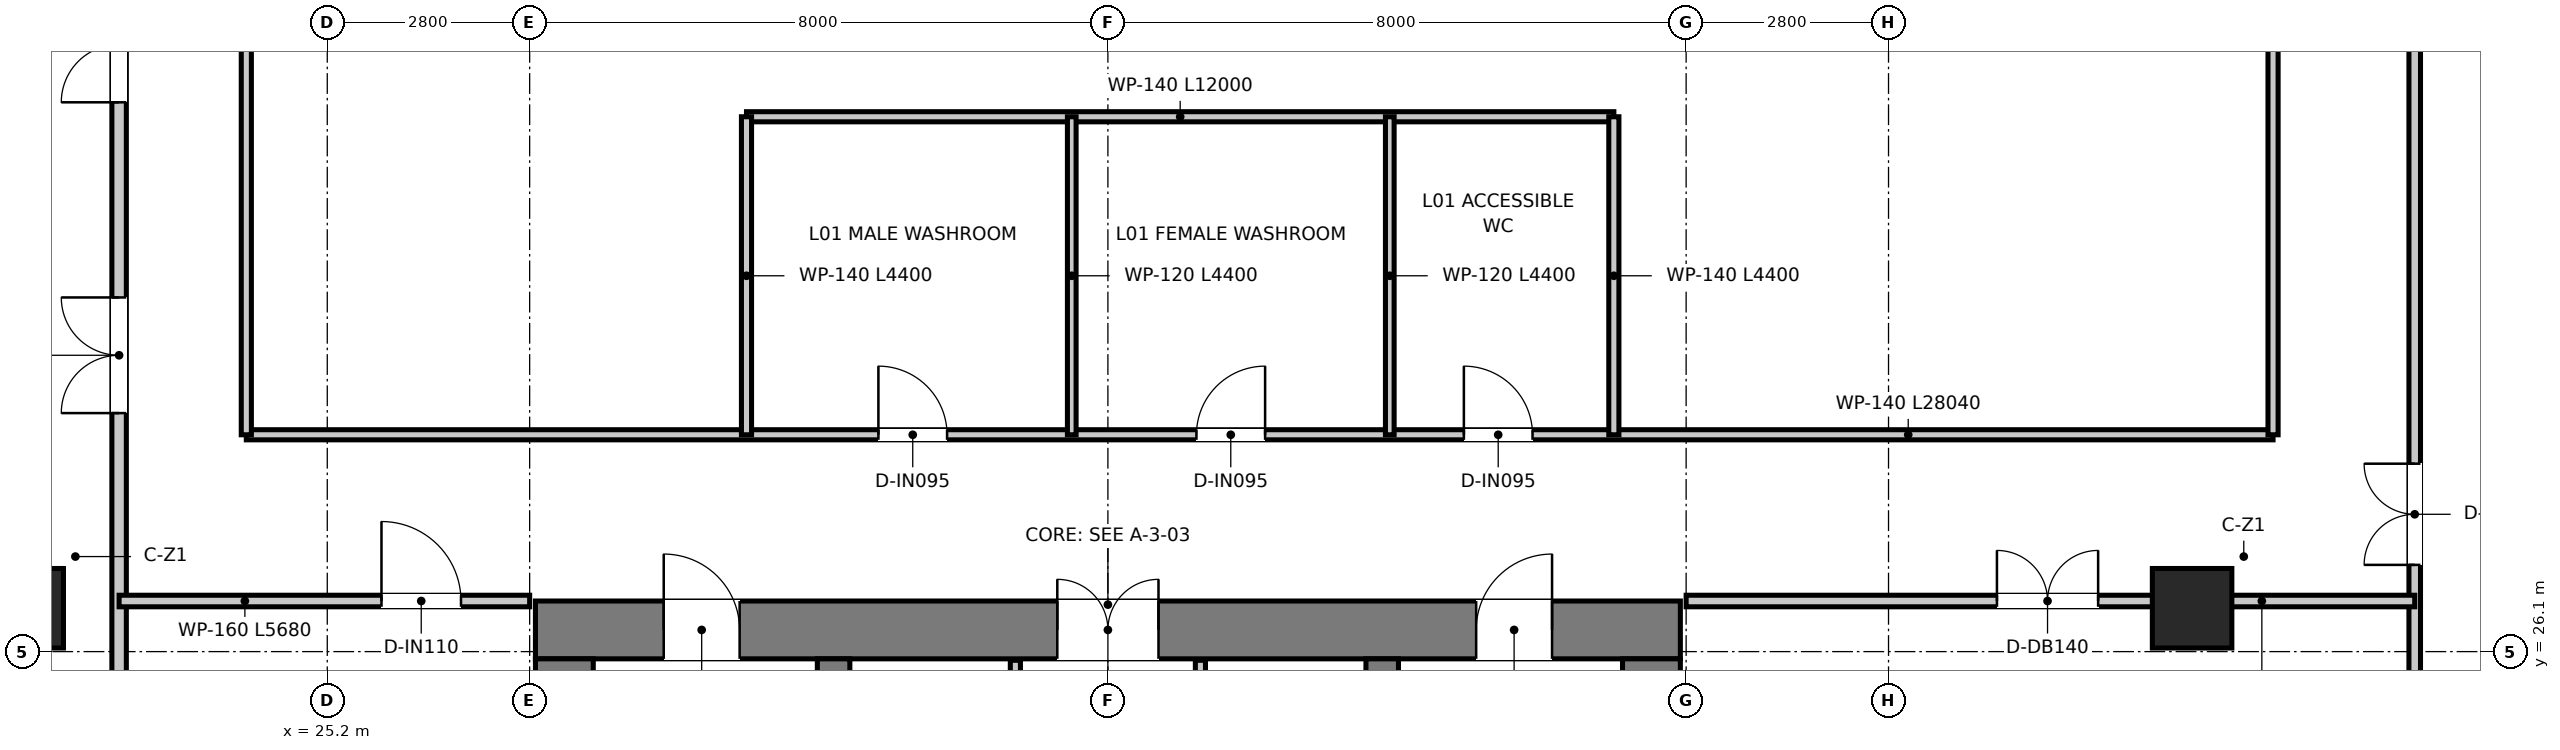
"""IFC4 building model, lengths in metres.
Left out: names, types, materials, properties, quantities, classifications, styles, units other than length and angle.
Written with IfcOpenShell. Run it as: python <this file> out.ifc"""

import sys

from ifc_helpers import new_model, si_unit, direction, frame, frame_2d, origin, origin_2d, place, context, subcontext, project, spatial, rectangle, extrude, source, transform, mapped, element, fill, save


model = new_model("IFC4")
c1 = context("Model", 3, precision=1e-05, world=origin(), true_north=direction((0.0, 1.0)))
c2 = subcontext(c1, "Body", "Model", "MODEL_VIEW")
j1 = project(units=[si_unit("LENGTHUNIT", "METRE"), si_unit("PLANEANGLEUNIT", "RADIAN")], contexts=[c1])
p1 = place(None, origin())
s1 = spatial("IfcSite", under=j1, at=p1, CompositionType="ELEMENT")
p2 = place(p1, origin())
s2 = spatial("IfcBuilding", under=s1, at=p2, CompositionType="ELEMENT")
p3 = place(p2, frame((0.0, 0.0, 5.4)))
s3 = spatial("IfcBuildingStorey", under=s2, at=p3, CompositionType="ELEMENT", Elevation=5.4)
p4 = place(p3, frame((28.08, 26.4, 0.0), z_axis=(0.0, 0.0, 1.0), x_axis=(1.0, 0.0, 0.0)))
e1 = element("IfcWall", 1, at=p4, inside=s3, PredefinedType="SHEAR", context=c2, shape_type="SweptSolid", body=[
    extrude(rectangle(XDim=15.84, YDim=0.8, at=frame_2d((7.92, 0.0))), origin(), (0.0, 0.0, 1.0), 5.0),
])
p5 = place(p4, frame((7.22, 0.0, 0.0)))
e2 = element("IfcOpeningElement", 2, at=p5, cuts=e1, PredefinedType="OPENING", context=c2, shape_type="SweptSolid", body=[
    extrude(rectangle(XDim=1.4, YDim=2.2, at=frame_2d((0.7, 1.1))), frame((0.0, 0.41, 0.0), z_axis=(0.0, -1.0, 0.0), x_axis=(1.0, 0.0, 0.0)), (0.0, 0.0, 1.0), 0.82),
])
p6 = place(p4, frame((1.775, 0.0, 0.0)))
e3 = element("IfcOpeningElement", 3, at=p6, cuts=e1, PredefinedType="OPENING", context=c2, shape_type="SweptSolid", body=[
    extrude(rectangle(XDim=1.05, YDim=2.1, at=frame_2d((0.525, 1.05))), frame((0.0, 0.41, 0.0), z_axis=(0.0, -1.0, 0.0), x_axis=(1.0, 0.0, 0.0)), (0.0, 0.0, 1.0), 0.82),
])
p7 = place(p4, frame((13.015, 0.0, 0.0)))
e4 = element("IfcOpeningElement", 4, at=p7, cuts=e1, PredefinedType="OPENING", context=c2, shape_type="SweptSolid", body=[
    extrude(rectangle(XDim=1.05, YDim=2.1, at=frame_2d((0.525, 1.05))), frame((0.0, 0.41, 0.0), z_axis=(0.0, -1.0, 0.0), x_axis=(1.0, 0.0, 0.0)), (0.0, 0.0, 1.0), 0.82),
])
for number, where, z_axis, x_axis in (
    (5, (28.48, 11.3, 0.0), (0.0, 0.0, 1.0), (0.0, 1.0, 0.0)),
    (6, (43.52, 11.3, 0.0), (0.0, 0.0, 1.0), (0.0, 1.0, 0.0)),
):
    element("IfcWall", number, at=place(p3, frame(where, z_axis=z_axis, x_axis=x_axis)), inside=s3, PredefinedType="SHEAR", context=c2, shape_type="SweptSolid", body=[
        extrude(rectangle(XDim=14.7, YDim=0.8, at=frame_2d((7.35, 0.0))), origin(), (0.0, 0.0, 1.0), 5.0),
    ])
p8 = place(p3, frame((32.205, 13.22, 0.0), z_axis=(0.0, 0.0, 1.0), x_axis=(0.0, 1.0, 0.0)))
e7 = element("IfcWall", 7, at=p8, inside=s3, PredefinedType="SHEAR", context=c2, shape_type="SweptSolid", body=[
    extrude(rectangle(XDim=12.78, YDim=0.45, at=frame_2d((6.39, 0.0))), origin(), (0.0, 0.0, 1.0), 5.0),
])
p9 = place(p8, frame((10.58, 0.0, 0.0)))
e8 = element("IfcOpeningElement", 8, at=p9, cuts=e7, PredefinedType="OPENING", context=c2, shape_type="SweptSolid", body=[
    extrude(rectangle(XDim=1.1, YDim=2.15, at=frame_2d((0.55, 1.075))), frame((0.0, 0.235, 0.0), z_axis=(0.0, -1.0, 0.0), x_axis=(1.0, 0.0, 0.0)), (0.0, 0.0, 1.0), 0.47),
])
p10 = place(p3, frame((39.795, 13.22, 0.0), z_axis=(0.0, 0.0, 1.0), x_axis=(0.0, 1.0, 0.0)))
e9 = element("IfcWall", 9, at=p10, inside=s3, PredefinedType="SHEAR", context=c2, shape_type="SweptSolid", body=[
    extrude(rectangle(XDim=12.78, YDim=0.45, at=frame_2d((6.39, 0.0))), origin(), (0.0, 0.0, 1.0), 5.0),
])
p11 = place(p10, frame((10.58, 0.0, 0.0)))
e10 = element("IfcOpeningElement", 10, at=p11, cuts=e9, PredefinedType="OPENING", context=c2, shape_type="SweptSolid", body=[
    extrude(rectangle(XDim=1.1, YDim=2.15, at=frame_2d((0.55, 1.075))), frame((0.0, 0.235, 0.0), z_axis=(0.0, -1.0, 0.0), x_axis=(1.0, 0.0, 0.0)), (0.0, 0.0, 1.0), 0.47),
])
m1 = source(origin(), c2, "Body", "SweptSolid", [
    extrude(rectangle(XDim=1.1, YDim=1.1, at=origin_2d()), origin(), (0.0, 0.0, 1.0), 5.0),
])
for number, where, z_axis, x_axis in (
    (11, (21.0, 26.7, 0.0), (0.0, 0.0, 1.0), (1.0, 0.0, 0.0)),
    (12, (51.0, 26.7, 0.0), (0.0, 0.0, 1.0), (1.0, 0.0, 0.0)),
):
    element("IfcColumn", number, at=place(p3, frame(where, z_axis=z_axis, x_axis=x_axis)), inside=s3, PredefinedType="COLUMN", context=c2, shape_type="MappedRepresentation", body=[
        mapped(m1, transform((0.0, 0.0, 0.0), x_axis=(1.0, 0.0, 0.0), y_axis=(0.0, 1.0, 0.0), z_axis=(0.0, 0.0, 1.0), scale=1.0)),
    ])
p12 = place(p3, frame((34.72, 20.2, 0.0), z_axis=(0.0, 0.0, 1.0), x_axis=(0.0, 1.0, 0.0)))
e13 = element("IfcWall", 13, at=p12, inside=s3, PredefinedType="PARTITIONING", context=c2, shape_type="SweptSolid", body=[
    extrude(rectangle(XDim=5.78, YDim=0.14, at=frame_2d((2.89, 0.0))), origin(), (0.0, 0.0, 1.0), 3.5),
])
p13 = place(p12, frame((1.05, 0.0, 0.0)))
e14 = element("IfcOpeningElement", 14, at=p13, cuts=e13, PredefinedType="OPENING", context=c2, shape_type="SweptSolid", body=[
    extrude(rectangle(XDim=0.9, YDim=2.1, at=frame_2d((0.45, 1.05))), frame((0.0, 0.08, 0.0), z_axis=(0.0, -1.0, 0.0), x_axis=(1.0, 0.0, 0.0)), (0.0, 0.0, 1.0), 0.16),
])
p14 = place(p3, frame((37.28, 20.2, 0.0), z_axis=(0.0, 0.0, 1.0), x_axis=(0.0, 1.0, 0.0)))
e15 = element("IfcWall", 15, at=p14, inside=s3, PredefinedType="PARTITIONING", context=c2, shape_type="SweptSolid", body=[
    extrude(rectangle(XDim=5.78, YDim=0.14, at=frame_2d((2.89, 0.0))), origin(), (0.0, 0.0, 1.0), 3.5),
])
p15 = place(p14, frame((0.95, 0.0, 0.0)))
e16 = element("IfcOpeningElement", 16, at=p15, cuts=e15, PredefinedType="OPENING", context=c2, shape_type="SweptSolid", body=[
    extrude(rectangle(XDim=1.1, YDim=2.15, at=frame_2d((0.55, 1.075))), frame((0.0, 0.08, 0.0), z_axis=(0.0, -1.0, 0.0), x_axis=(1.0, 0.0, 0.0)), (0.0, 0.0, 1.0), 0.16),
])
p16 = place(p3, frame((24.08, 29.1, 0.0), z_axis=(0.0, 0.0, 1.0), x_axis=(1.0, 0.0, 0.0)))
e17 = element("IfcWall", 17, at=p16, inside=s3, PredefinedType="PARTITIONING", context=c2, shape_type="SweptSolid", body=[
    extrude(rectangle(XDim=28.04, YDim=0.14, at=frame_2d((14.02, 0.0))), origin(), (0.0, 0.0, 1.0), 3.9),
])
p17 = place(p16, frame((8.745, 0.0, 0.0)))
e18 = element("IfcOpeningElement", 18, at=p17, cuts=e17, PredefinedType="OPENING", context=c2, shape_type="SweptSolid", body=[
    extrude(rectangle(XDim=0.95, YDim=2.1, at=frame_2d((0.475, 1.05))), frame((0.0, 0.08, 0.0), z_axis=(0.0, -1.0, 0.0), x_axis=(1.0, 0.0, 0.0)), (0.0, 0.0, 1.0), 0.16),
])
p18 = place(p16, frame((13.145, 0.0, 0.0)))
e19 = element("IfcOpeningElement", 19, at=p18, cuts=e17, PredefinedType="OPENING", context=c2, shape_type="SweptSolid", body=[
    extrude(rectangle(XDim=0.95, YDim=2.1, at=frame_2d((0.475, 1.05))), frame((0.0, 0.08, 0.0), z_axis=(0.0, -1.0, 0.0), x_axis=(1.0, 0.0, 0.0)), (0.0, 0.0, 1.0), 0.16),
])
p19 = place(p16, frame((16.845, 0.0, 0.0)))
e20 = element("IfcOpeningElement", 20, at=p19, cuts=e17, PredefinedType="OPENING", context=c2, shape_type="SweptSolid", body=[
    extrude(rectangle(XDim=0.95, YDim=2.1, at=frame_2d((0.475, 1.05))), frame((0.0, 0.08, 0.0), z_axis=(0.0, -1.0, 0.0), x_axis=(1.0, 0.0, 0.0)), (0.0, 0.0, 1.0), 0.16),
])
p20 = place(p3, frame((22.32, 0.605, 0.0), z_axis=(0.0, 0.0, 1.0), x_axis=(0.0, 1.0, 0.0)))
e21 = element("IfcWall", 21, at=p20, inside=s3, PredefinedType="PARTITIONING", context=c2, shape_type="SweptSolid", body=[
    extrude(rectangle(XDim=49.215, YDim=0.2, at=frame_2d((24.607, 0.0))), origin(), (0.0, 0.0, 1.0), 4.0),
])
p21 = place(p20, frame((28.795, 0.0, 0.0)))
e22 = element("IfcOpeningElement", 22, at=p21, cuts=e21, PredefinedType="OPENING", context=c2, shape_type="SweptSolid", body=[
    extrude(rectangle(XDim=1.6, YDim=2.2, at=frame_2d((0.8, 1.1))), frame((0.0, 0.11, 0.0), z_axis=(0.0, -1.0, 0.0), x_axis=(1.0, 0.0, 0.0)), (0.0, 0.0, 1.0), 0.22),
])
p22 = place(p20, frame((33.095, 0.0, 0.0)))
e23 = element("IfcOpeningElement", 23, at=p22, cuts=e21, PredefinedType="OPENING", context=c2, shape_type="SweptSolid", body=[
    extrude(rectangle(XDim=1.6, YDim=2.2, at=frame_2d((0.8, 1.1))), frame((0.0, 0.11, 0.0), z_axis=(0.0, -1.0, 0.0), x_axis=(1.0, 0.0, 0.0)), (0.0, 0.0, 1.0), 0.22),
])
p23 = place(p20, frame((42.845, 0.0, 0.0)))
e24 = element("IfcOpeningElement", 24, at=p23, cuts=e21, PredefinedType="OPENING", context=c2, shape_type="SweptSolid", body=[
    extrude(rectangle(XDim=1.1, YDim=2.15, at=frame_2d((0.55, 1.075))), frame((0.0, 0.11, 0.0), z_axis=(0.0, -1.0, 0.0), x_axis=(1.0, 0.0, 0.0)), (0.0, 0.0, 1.0), 0.22),
])
p24 = place(p3, frame((24.08, 29.1, 0.0), z_axis=(0.0, 0.0, 1.0), x_axis=(0.0, 1.0, 0.0)))
e25 = element("IfcWall", 25, at=p24, inside=s3, PredefinedType="PARTITIONING", context=c2, shape_type="SweptSolid", body=[
    extrude(rectangle(XDim=20.72, YDim=0.14, at=frame_2d((10.36, 0.0))), origin(), (0.0, 0.0, 1.0), 4.0),
])
p25 = place(p24, frame((11.2, 0.0, 0.0)))
e26 = element("IfcOpeningElement", 26, at=p25, cuts=e25, PredefinedType="OPENING", context=c2, shape_type="SweptSolid", body=[
    extrude(rectangle(XDim=1.4, YDim=2.2, at=frame_2d((0.7, 1.1))), frame((0.0, 0.08, 0.0), z_axis=(0.0, -1.0, 0.0), x_axis=(1.0, 0.0, 0.0)), (0.0, 0.0, 1.0), 0.16),
])
p26 = place(p3, frame((52.12, 29.1, 0.0), z_axis=(0.0, 0.0, 1.0), x_axis=(0.0, 1.0, 0.0)))
e27 = element("IfcWall", 27, at=p26, inside=s3, PredefinedType="PARTITIONING", context=c2, shape_type="SweptSolid", body=[
    extrude(rectangle(XDim=20.72, YDim=0.14, at=frame_2d((10.36, 0.0))), origin(), (0.0, 0.0, 1.0), 4.06),
])
p27 = place(p3, frame((54.08, 0.605, 0.0), z_axis=(0.0, 0.0, 1.0), x_axis=(0.0, 1.0, 0.0)))
e28 = element("IfcWall", 28, at=p27, inside=s3, PredefinedType="PARTITIONING", context=c2, shape_type="SweptSolid", body=[
    extrude(rectangle(XDim=49.215, YDim=0.16, at=frame_2d((24.607, 0.0))), origin(), (0.0, 0.0, 1.0), 4.06),
])
p28 = place(p27, frame((26.695, 0.0, 0.0)))
e29 = element("IfcOpeningElement", 29, at=p28, cuts=e28, PredefinedType="OPENING", context=c2, shape_type="SweptSolid", body=[
    extrude(rectangle(XDim=1.4, YDim=2.2, at=frame_2d((0.7, 1.1))), frame((0.0, 0.09, 0.0), z_axis=(0.0, -1.0, 0.0), x_axis=(1.0, 0.0, 0.0)), (0.0, 0.0, 1.0), 0.18),
])
p29 = place(p3, frame((31.0, 33.5, 0.0), z_axis=(0.0, 0.0, 1.0), x_axis=(1.0, 0.0, 0.0)))
e30 = element("IfcWall", 30, at=p29, inside=s3, PredefinedType="PARTITIONING", context=c2, shape_type="SweptSolid", body=[
    extrude(rectangle(XDim=12.0, YDim=0.14, at=frame_2d((6.0, 0.0))), origin(), (0.0, 0.0, 1.0), 4.7),
])
for number, where, z_axis, x_axis in (
    (31, (31.0, 29.1, 0.0), (0.0, 0.0, 1.0), (0.0, 1.0, 0.0)),
    (32, (43.0, 29.1, 0.0), (0.0, 0.0, 1.0), (0.0, 1.0, 0.0)),
):
    element("IfcWall", number, at=place(p3, frame(where, z_axis=z_axis, x_axis=x_axis)), inside=s3, PredefinedType="PARTITIONING", context=c2, shape_type="SweptSolid", body=[
        extrude(rectangle(XDim=4.4, YDim=0.14, at=frame_2d((2.2, 0.0))), origin(), (0.0, 0.0, 1.0), 4.15),
    ])
for number, where, z_axis, x_axis in (
    (33, (35.5, 29.1, 0.0), (0.0, 0.0, 1.0), (0.0, 1.0, 0.0)),
    (34, (39.9, 29.1, 0.0), (0.0, 0.0, 1.0), (0.0, 1.0, 0.0)),
):
    element("IfcWall", number, at=place(p3, frame(where, z_axis=z_axis, x_axis=x_axis)), inside=s3, PredefinedType="PARTITIONING", context=c2, shape_type="SweptSolid", body=[
        extrude(rectangle(XDim=4.4, YDim=0.12, at=frame_2d((2.2, 0.0))), origin(), (0.0, 0.0, 1.0), 4.15),
    ])
p30 = place(p3, frame((22.32, 26.8, 0.0), z_axis=(0.0, 0.0, 1.0), x_axis=(1.0, 0.0, 0.0)))
e35 = element("IfcWall", 35, at=p30, inside=s3, PredefinedType="PARTITIONING", context=c2, shape_type="SweptSolid", body=[
    extrude(rectangle(XDim=5.68, YDim=0.16, at=frame_2d((2.84, 0.0))), origin(), (0.0, 0.0, 1.0), 3.9),
])
p31 = place(p30, frame((3.63, 0.0, 0.0)))
e36 = element("IfcOpeningElement", 36, at=p31, cuts=e35, PredefinedType="OPENING", context=c2, shape_type="SweptSolid", body=[
    extrude(rectangle(XDim=1.1, YDim=2.15, at=frame_2d((0.55, 1.075))), frame((0.0, 0.09, 0.0), z_axis=(0.0, -1.0, 0.0), x_axis=(1.0, 0.0, 0.0)), (0.0, 0.0, 1.0), 0.18),
])
p32 = place(p3, frame((44.0, 26.8, 0.0), z_axis=(0.0, 0.0, 1.0), x_axis=(1.0, 0.0, 0.0)))
e37 = element("IfcWall", 37, at=p32, inside=s3, PredefinedType="PARTITIONING", context=c2, shape_type="SweptSolid", body=[
    extrude(rectangle(XDim=10.08, YDim=0.16, at=frame_2d((5.04, 0.0))), origin(), (0.0, 0.0, 1.0), 3.9),
])
p33 = place(p32, frame((4.3, 0.0, 0.0)))
e38 = element("IfcOpeningElement", 38, at=p33, cuts=e37, PredefinedType="OPENING", context=c2, shape_type="SweptSolid", body=[
    extrude(rectangle(XDim=1.4, YDim=2.2, at=frame_2d((0.7, 1.1))), frame((0.0, 0.09, 0.0), z_axis=(0.0, -1.0, 0.0), x_axis=(1.0, 0.0, 0.0)), (0.0, 0.0, 1.0), 0.18),
])
p34 = place(p5, origin())
e39 = element("IfcDoor", 39, at=p34, inside=s3, OperationType="DOUBLE_DOOR_SINGLE_SWING", PredefinedType="DOOR", context=c2, shape_type="SweptSolid", body=[
    extrude(rectangle(XDim=1.4, YDim=2.2, at=frame_2d((0.7, 1.1))), frame((0.0, 0.025, 0.0), z_axis=(0.0, -1.0, 0.0), x_axis=(1.0, 0.0, 0.0)), (0.0, 0.0, 1.0), 0.05),
])
fill(e2, e39)
p35 = place(p6, origin())
e40 = element("IfcDoor", 40, at=p35, inside=s3, OperationType="SINGLE_SWING_LEFT", PredefinedType="DOOR", context=c2, shape_type="SweptSolid", body=[
    extrude(rectangle(XDim=1.05, YDim=2.1, at=frame_2d((0.525, 1.05))), frame((0.0, 0.025, 0.0), z_axis=(0.0, -1.0, 0.0), x_axis=(1.0, 0.0, 0.0)), (0.0, 0.0, 1.0), 0.05),
])
fill(e3, e40)
p36 = place(p7, origin())
e41 = element("IfcDoor", 41, at=p36, inside=s3, OperationType="SINGLE_SWING_RIGHT", PredefinedType="DOOR", context=c2, shape_type="SweptSolid", body=[
    extrude(rectangle(XDim=1.05, YDim=2.1, at=frame_2d((0.525, 1.05))), frame((0.0, 0.025, 0.0), z_axis=(0.0, -1.0, 0.0), x_axis=(1.0, 0.0, 0.0)), (0.0, 0.0, 1.0), 0.05),
])
fill(e4, e41)
p37 = place(p17, origin())
e42 = element("IfcDoor", 42, at=p37, inside=s3, OperationType="SINGLE_SWING_LEFT", PredefinedType="DOOR", context=c2, shape_type="SweptSolid", body=[
    extrude(rectangle(XDim=0.95, YDim=2.1, at=frame_2d((0.475, 1.05))), frame((0.0, 0.025, 0.0), z_axis=(0.0, -1.0, 0.0), x_axis=(1.0, 0.0, 0.0)), (0.0, 0.0, 1.0), 0.05),
])
fill(e18, e42)
p38 = place(p18, origin())
e43 = element("IfcDoor", 43, at=p38, inside=s3, OperationType="SINGLE_SWING_RIGHT", PredefinedType="DOOR", context=c2, shape_type="SweptSolid", body=[
    extrude(rectangle(XDim=0.95, YDim=2.1, at=frame_2d((0.475, 1.05))), frame((0.0, 0.025, 0.0), z_axis=(0.0, -1.0, 0.0), x_axis=(1.0, 0.0, 0.0)), (0.0, 0.0, 1.0), 0.05),
])
fill(e19, e43)
p39 = place(p19, origin())
e44 = element("IfcDoor", 44, at=p39, inside=s3, OperationType="SINGLE_SWING_LEFT", PredefinedType="DOOR", context=c2, shape_type="SweptSolid", body=[
    extrude(rectangle(XDim=0.95, YDim=2.1, at=frame_2d((0.475, 1.05))), frame((0.0, 0.025, 0.0), z_axis=(0.0, -1.0, 0.0), x_axis=(1.0, 0.0, 0.0)), (0.0, 0.0, 1.0), 0.05),
])
fill(e20, e44)
p40 = place(p21, origin())
e45 = element("IfcDoor", 45, at=p40, inside=s3, OperationType="DOUBLE_DOOR_SINGLE_SWING", PredefinedType="DOOR", context=c2, shape_type="SweptSolid", body=[
    extrude(rectangle(XDim=1.6, YDim=2.2, at=frame_2d((0.8, 1.1))), frame((0.0, 0.025, 0.0), z_axis=(0.0, -1.0, 0.0), x_axis=(1.0, 0.0, 0.0)), (0.0, 0.0, 1.0), 0.05),
])
fill(e22, e45)
p41 = place(p22, origin())
e46 = element("IfcDoor", 46, at=p41, inside=s3, OperationType="DOUBLE_DOOR_SINGLE_SWING", PredefinedType="DOOR", context=c2, shape_type="SweptSolid", body=[
    extrude(rectangle(XDim=1.6, YDim=2.2, at=frame_2d((0.8, 1.1))), frame((0.0, 0.025, 0.0), z_axis=(0.0, -1.0, 0.0), x_axis=(1.0, 0.0, 0.0)), (0.0, 0.0, 1.0), 0.05),
])
fill(e23, e46)
p42 = place(p33, origin())
e47 = element("IfcDoor", 47, at=p42, inside=s3, OperationType="DOUBLE_DOOR_SINGLE_SWING", PredefinedType="DOOR", context=c2, shape_type="SweptSolid", body=[
    extrude(rectangle(XDim=1.4, YDim=2.2, at=frame_2d((0.7, 1.1))), frame((0.0, 0.025, 0.0), z_axis=(0.0, -1.0, 0.0), x_axis=(1.0, 0.0, 0.0)), (0.0, 0.0, 1.0), 0.05),
])
fill(e38, e47)
p43 = place(p28, origin())
e48 = element("IfcDoor", 48, at=p43, inside=s3, OperationType="DOUBLE_DOOR_SINGLE_SWING", PredefinedType="DOOR", context=c2, shape_type="SweptSolid", body=[
    extrude(rectangle(XDim=1.4, YDim=2.2, at=frame_2d((0.7, 1.1))), frame((0.0, 0.025, 0.0), z_axis=(0.0, -1.0, 0.0), x_axis=(1.0, 0.0, 0.0)), (0.0, 0.0, 1.0), 0.05),
])
fill(e29, e48)
p44 = place(p31, origin())
e49 = element("IfcDoor", 49, at=p44, inside=s3, OperationType="SINGLE_SWING_LEFT", PredefinedType="DOOR", context=c2, shape_type="SweptSolid", body=[
    extrude(rectangle(XDim=1.1, YDim=2.15, at=frame_2d((0.55, 1.075))), frame((0.0, 0.025, 0.0), z_axis=(0.0, -1.0, 0.0), x_axis=(1.0, 0.0, 0.0)), (0.0, 0.0, 1.0), 0.05),
])
fill(e36, e49)
save(model, sys.argv[1])
